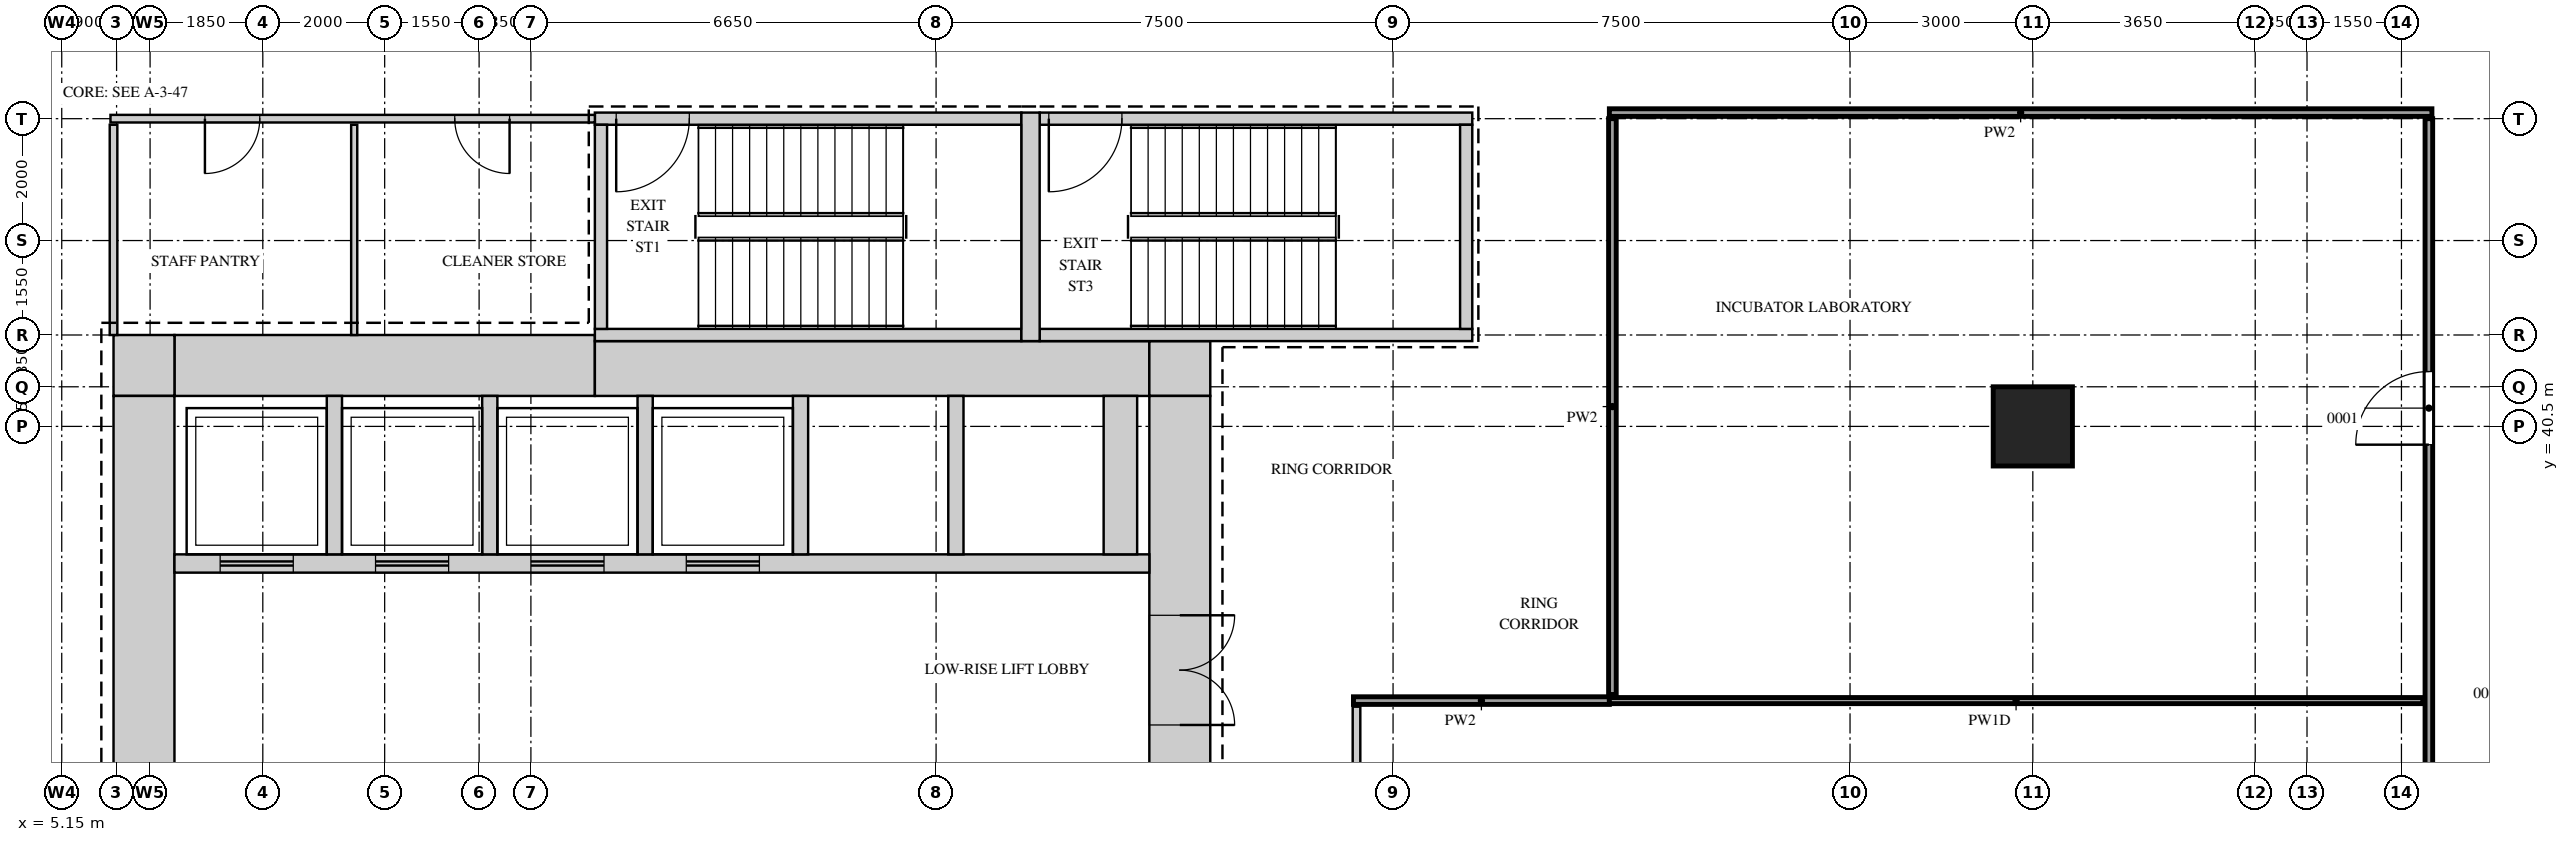
"""IFC4 building model, lengths in metres.
Left out: names, types, materials, properties, quantities, classifications, styles, units other than length and angle.
Written with IfcOpenShell. Run it as: python <this file> out.ifc"""

import sys

from ifc_helpers import new_model, si_unit, direction, frame, frame_2d, origin, origin_2d, place, context, subcontext, project, spatial, rectangle, extrude, source, transform, mapped, element, fill, save


model = new_model("IFC4")
c1 = context("Model", 3, precision=1e-05, world=origin(), true_north=direction((0.0, 1.0)))
c2 = subcontext(c1, "Body", "Model", "MODEL_VIEW")
j1 = project(units=[si_unit("LENGTHUNIT", "METRE"), si_unit("PLANEANGLEUNIT", "RADIAN")], contexts=[c1])
p1 = place(None, origin())
s1 = spatial("IfcSite", under=j1, at=p1, CompositionType="ELEMENT")
p2 = place(p1, origin())
s2 = spatial("IfcBuilding", under=s1, at=p2, CompositionType="ELEMENT")
p3 = place(p2, frame((0.0, 0.0, 149.9)))
s3 = spatial("IfcBuildingStorey", under=s2, at=p3, CompositionType="ELEMENT", Elevation=149.9)
m1 = source(origin(), c2, "Body", "SweptSolid", [
    extrude(rectangle(XDim=6.9, YDim=1.0, at=frame_2d((3.45, 0.0))), origin(), (0.0, 0.0, 1.0), 4.1),
])
p4 = place(p3, frame((7.0, 41.5, 0.0), z_axis=(0.0, 0.0, 1.0), x_axis=(1.0, 0.0, 0.0)))
e1 = element("IfcWall", 1, at=p4, inside=s3, PredefinedType="SHEAR", context=c2, shape_type="MappedRepresentation", body=[
    mapped(m1, transform((0.0, 0.0, 0.0))),
])
m2 = source(origin(), c2, "Body", "SweptSolid", [
    extrude(rectangle(XDim=9.1, YDim=0.9, at=frame_2d((4.55, 0.0))), origin(), (0.0, 0.0, 1.0), 4.1),
])
p5 = place(p3, frame((13.9, 41.45, 0.0), z_axis=(0.0, 0.0, 1.0), x_axis=(1.0, 0.0, 0.0)))
e2 = element("IfcWall", 2, at=p5, inside=s3, PredefinedType="SHEAR", context=c2, shape_type="MappedRepresentation", body=[
    mapped(m2, transform((0.0, 0.0, 0.0))),
])
m3 = source(origin(), c2, "Body", "SweptSolid", [
    extrude(rectangle(XDim=1.0, YDim=0.9, at=frame_2d((0.5, 0.0))), origin(), (0.0, 0.0, 1.0), 4.1),
])
p6 = place(p3, frame((23.0, 41.45, 0.0), z_axis=(0.0, 0.0, 1.0), x_axis=(1.0, 0.0, 0.0)))
e3 = element("IfcWall", 3, at=p6, inside=s3, PredefinedType="SHEAR", context=c2, shape_type="MappedRepresentation", body=[
    mapped(m3, transform((0.0, 0.0, 0.0))),
])
m4 = source(origin(), c2, "Body", "SweptSolid", [
    extrude(rectangle(XDim=1.0, YDim=1.0, at=frame_2d((0.5, 0.0))), origin(), (0.0, 0.0, 1.0), 4.1),
])
p7 = place(p3, frame((6.0, 41.5, 0.0), z_axis=(0.0, 0.0, 1.0), x_axis=(1.0, 0.0, 0.0)))
e4 = element("IfcWall", 4, at=p7, inside=s3, PredefinedType="SHEAR", context=c2, shape_type="MappedRepresentation", body=[
    mapped(m4, transform((0.0, 0.0, 0.0))),
])
m5 = source(origin(), c2, "Body", "SweptSolid", [
    extrude(rectangle(XDim=28.0, YDim=1.0, at=frame_2d((14.0, 0.0))), origin(), (0.0, 0.0, 1.0), 4.1),
])
p8 = place(p3, frame((23.5, 13.0, 0.0), z_axis=(0.0, 0.0, 1.0), x_axis=(0.0, 1.0, 0.0)))
e5 = element("IfcWall", 5, at=p8, inside=s3, PredefinedType="SHEAR", context=c2, shape_type="MappedRepresentation", body=[
    mapped(m5, transform((0.0, 0.0, 0.0))),
])
m6 = source(origin(), c2, "Body", "SweptSolid", [
    extrude(rectangle(XDim=1.8, YDim=2.1, at=frame_2d((0.9, 1.05))), frame((0.0, 0.51, 0.0), z_axis=(0.0, -1.0, 0.0), x_axis=(1.0, 0.0, 0.0)), (0.0, 0.0, 1.0), 1.02),
])
p9 = place(p8, frame((22.6, 0.0, 0.0)))
e6 = element("IfcOpeningElement", 6, at=p9, cuts=e5, PredefinedType="OPENING", context=c2, shape_type="MappedRepresentation", body=[
    mapped(m6, transform((0.0, 0.0, 0.0))),
])
m7 = source(origin(), c2, "Body", "SweptSolid", [
    extrude(rectangle(XDim=1.2, YDim=2.1, at=frame_2d((0.6, 1.05))), frame((0.0, 0.51, 0.0), z_axis=(0.0, -1.0, 0.0), x_axis=(1.0, 0.0, 0.0)), (0.0, 0.0, 1.0), 1.02),
])
p10 = place(p8, frame((14.6, 0.0, 0.0)))
e7 = element("IfcOpeningElement", 7, at=p10, cuts=e5, PredefinedType="OPENING", context=c2, shape_type="MappedRepresentation", body=[
    mapped(m7, transform((0.0, 0.0, 0.0))),
])
m8 = source(origin(), c2, "Body", "SweptSolid", [
    extrude(rectangle(XDim=0.9, YDim=2.1, at=frame_2d((0.45, 1.05))), frame((0.0, 0.51, 0.0), z_axis=(0.0, -1.0, 0.0), x_axis=(1.0, 0.0, 0.0)), (0.0, 0.0, 1.0), 1.02),
])
p11 = place(p8, frame((1.35, 0.0, 0.0)))
e8 = element("IfcOpeningElement", 8, at=p11, cuts=e5, PredefinedType="OPENING", context=c2, shape_type="MappedRepresentation", body=[
    mapped(m8, transform((0.0, 0.0, 0.0))),
])
p12 = place(p8, frame((6.2, 0.0, 0.0)))
e9 = element("IfcOpeningElement", 9, at=p12, cuts=e5, PredefinedType="OPENING", context=c2, shape_type="MappedRepresentation", body=[
    mapped(m8, transform((0.0, 0.0, 0.0))),
])
p13 = place(p3, frame((6.5, 13.0, 0.0), z_axis=(0.0, 0.0, 1.0), x_axis=(0.0, 1.0, 0.0)))
e10 = element("IfcWall", 10, at=p13, inside=s3, PredefinedType="SHEAR", context=c2, shape_type="MappedRepresentation", body=[
    mapped(m5, transform((0.0, 0.0, 0.0))),
])
m9 = source(origin(), c2, "Body", "SweptSolid", [
    extrude(rectangle(XDim=7.0, YDim=0.2, at=frame_2d((3.5, 0.0))), origin(), (0.0, 0.0, 1.0), 4.1),
])
p14 = place(p3, frame((13.9, 45.55, 0.0), z_axis=(0.0, 0.0, 1.0), x_axis=(1.0, 0.0, 0.0)))
e11 = element("IfcWall", 11, at=p14, inside=s3, PredefinedType="SHEAR", context=c2, shape_type="MappedRepresentation", body=[
    mapped(m9, transform((0.0, 0.0, 0.0))),
])
m10 = source(origin(), c2, "Body", "SweptSolid", [
    extrude(rectangle(XDim=1.2, YDim=2.1, at=frame_2d((0.6, 1.05))), frame((0.0, 0.11, 0.0), z_axis=(0.0, -1.0, 0.0), x_axis=(1.0, 0.0, 0.0)), (0.0, 0.0, 1.0), 0.22),
])
p15 = place(p14, frame((0.35, 0.0, 0.0)))
e12 = element("IfcOpeningElement", 12, at=p15, cuts=e11, PredefinedType="OPENING", context=c2, shape_type="MappedRepresentation", body=[
    mapped(m10, transform((0.0, 0.0, 0.0))),
])
p16 = place(p3, frame((13.9, 42.0, 0.0), z_axis=(0.0, 0.0, 1.0), x_axis=(1.0, 0.0, 0.0)))
e13 = element("IfcWall", 13, at=p16, inside=s3, PredefinedType="SHEAR", context=c2, shape_type="MappedRepresentation", body=[
    mapped(m9, transform((0.0, 0.0, 0.0))),
])
m11 = source(origin(), c2, "Body", "SweptSolid", [
    extrude(rectangle(XDim=7.1, YDim=0.2, at=frame_2d((3.55, 0.0))), origin(), (0.0, 0.0, 1.0), 4.1),
])
p17 = place(p3, frame((21.2, 45.55, 0.0), z_axis=(0.0, 0.0, 1.0), x_axis=(1.0, 0.0, 0.0)))
e14 = element("IfcWall", 14, at=p17, inside=s3, PredefinedType="SHEAR", context=c2, shape_type="MappedRepresentation", body=[
    mapped(m11, transform((0.0, 0.0, 0.0))),
])
p18 = place(p17, frame((0.15, 0.0, 0.0)))
e15 = element("IfcOpeningElement", 15, at=p18, cuts=e14, PredefinedType="OPENING", context=c2, shape_type="MappedRepresentation", body=[
    mapped(m10, transform((0.0, 0.0, 0.0))),
])
p19 = place(p3, frame((21.2, 42.0, 0.0), z_axis=(0.0, 0.0, 1.0), x_axis=(1.0, 0.0, 0.0)))
e16 = element("IfcWall", 16, at=p19, inside=s3, PredefinedType="SHEAR", context=c2, shape_type="MappedRepresentation", body=[
    mapped(m11, transform((0.0, 0.0, 0.0))),
])
m12 = source(origin(), c2, "Body", "SweptSolid", [
    extrude(rectangle(XDim=3.75, YDim=0.3, at=frame_2d((1.875, 0.0))), origin(), (0.0, 0.0, 1.0), 4.1),
])
p20 = place(p3, frame((21.05, 41.9, 0.0), z_axis=(0.0, 0.0, 1.0), x_axis=(0.0, 1.0, 0.0)))
e17 = element("IfcWall", 17, at=p20, inside=s3, PredefinedType="SHEAR", context=c2, shape_type="MappedRepresentation", body=[
    mapped(m12, transform((0.0, 0.0, 0.0))),
])
m13 = source(origin(), c2, "Body", "SweptSolid", [
    extrude(rectangle(XDim=3.35, YDim=0.2, at=frame_2d((1.675, 0.0))), origin(), (0.0, 0.0, 1.0), 4.1),
])
for number, where, z_axis, x_axis in (
    (18, (14.0, 42.1, 0.0), (0.0, 0.0, 1.0), (0.0, 1.0, 0.0)),
    (19, (28.2, 42.1, 0.0), (0.0, 0.0, 1.0), (0.0, 1.0, 0.0)),
):
    element("IfcWall", number, at=place(p3, frame(where, z_axis=z_axis, x_axis=x_axis)), inside=s3, PredefinedType="SHEAR", context=c2, shape_type="MappedRepresentation", body=[
        mapped(m13, transform((0.0, 0.0, 0.0))),
    ])
m14 = source(origin(), c2, "Body", "SweptSolid", [
    extrude(rectangle(XDim=16.0, YDim=0.3, at=frame_2d((8.0, 0.0))), origin(), (0.0, 0.0, 1.0), 4.1),
])
p21 = place(p3, frame((7.0, 38.25, 0.0), z_axis=(0.0, 0.0, 1.0), x_axis=(1.0, 0.0, 0.0)))
e20 = element("IfcWall", 20, at=p21, inside=s3, PredefinedType="STANDARD", context=c2, shape_type="MappedRepresentation", body=[
    mapped(m14, transform((0.0, 0.0, 0.0))),
])
m15 = source(origin(), c2, "Body", "SweptSolid", [
    extrude(rectangle(XDim=1.2, YDim=2.1, at=frame_2d((0.6, 1.05))), frame((0.0, 0.16, 0.0), z_axis=(0.0, -1.0, 0.0), x_axis=(1.0, 0.0, 0.0)), (0.0, 0.0, 1.0), 0.32),
])
p22 = place(p21, frame((0.75, 0.0, 0.0)))
e21 = element("IfcOpeningElement", 21, at=p22, cuts=e20, PredefinedType="OPENING", context=c2, shape_type="MappedRepresentation", body=[
    mapped(m15, transform((0.0, 0.0, 0.0))),
])
p23 = place(p21, frame((3.3, 0.0, 0.0)))
e22 = element("IfcOpeningElement", 22, at=p23, cuts=e20, PredefinedType="OPENING", context=c2, shape_type="MappedRepresentation", body=[
    mapped(m15, transform((0.0, 0.0, 0.0))),
])
p24 = place(p21, frame((5.85, 0.0, 0.0)))
e23 = element("IfcOpeningElement", 23, at=p24, cuts=e20, PredefinedType="OPENING", context=c2, shape_type="MappedRepresentation", body=[
    mapped(m15, transform((0.0, 0.0, 0.0))),
])
p25 = place(p21, frame((8.4, 0.0, 0.0)))
e24 = element("IfcOpeningElement", 24, at=p25, cuts=e20, PredefinedType="OPENING", context=c2, shape_type="MappedRepresentation", body=[
    mapped(m15, transform((0.0, 0.0, 0.0))),
])
m16 = source(origin(), c2, "Body", "SweptSolid", [
    extrude(rectangle(XDim=2.6, YDim=0.25, at=frame_2d((1.3, 0.0))), origin(), (0.0, 0.0, 1.0), 4.1),
])
for number, where, z_axis, x_axis in (
    (25, (9.625, 38.4, 0.0), (0.0, 0.0, 1.0), (0.0, 1.0, 0.0)),
    (26, (12.175, 38.4, 0.0), (0.0, 0.0, 1.0), (0.0, 1.0, 0.0)),
    (27, (14.725, 38.4, 0.0), (0.0, 0.0, 1.0), (0.0, 1.0, 0.0)),
    (28, (17.275, 38.4, 0.0), (0.0, 0.0, 1.0), (0.0, 1.0, 0.0)),
    (29, (19.825, 38.4, 0.0), (0.0, 0.0, 1.0), (0.0, 1.0, 0.0)),
):
    element("IfcWall", number, at=place(p3, frame(where, z_axis=z_axis, x_axis=x_axis)), inside=s3, PredefinedType="STANDARD", context=c2, shape_type="MappedRepresentation", body=[
        mapped(m16, transform((0.0, 0.0, 0.0))),
    ])
m17 = source(origin(), c2, "Body", "SweptSolid", [
    extrude(rectangle(XDim=2.6, YDim=0.55, at=frame_2d((1.3, 0.0))), origin(), (0.0, 0.0, 1.0), 4.1),
])
p26 = place(p3, frame((22.525, 38.4, 0.0), z_axis=(0.0, 0.0, 1.0), x_axis=(0.0, 1.0, 0.0)))
e30 = element("IfcWall", 30, at=p26, inside=s3, PredefinedType="STANDARD", context=c2, shape_type="MappedRepresentation", body=[
    mapped(m17, transform((0.0, 0.0, 0.0))),
])
m18 = source(origin(), c2, "Body", "SweptSolid", [
    extrude(rectangle(XDim=1.3, YDim=1.3, at=origin_2d()), origin(), (0.0, 0.0, 1.0), 4.1),
])
p27 = place(p3, frame((37.5, 40.5, 0.0), z_axis=(0.0, 0.0, 1.0), x_axis=(1.0, 0.0, 0.0)))
e31 = element("IfcColumn", 31, at=p27, inside=s3, PredefinedType="COLUMN", context=c2, shape_type="MappedRepresentation", body=[
    mapped(m18, transform((0.0, 0.0, 0.0))),
])
m19 = source(origin(), c2, "Body", "SweptSolid", [
    extrude(rectangle(XDim=23.2, YDim=0.125, at=frame_2d((11.6, 0.0))), origin(), (0.0, 0.0, 1.0), 4.2),
])
p28 = place(p3, frame((26.4, 12.7, 0.0), z_axis=(0.0, 0.0, 1.0), x_axis=(0.0, 1.0, 0.0)))
e32 = element("IfcWall", 32, at=p28, inside=s3, PredefinedType="PARTITIONING", context=c2, shape_type="MappedRepresentation", body=[
    mapped(m19, transform((0.0, 0.0, 0.0))),
])
m20 = source(origin(), c2, "Body", "SweptSolid", [
    extrude(rectangle(XDim=1.2, YDim=2.1, at=frame_2d((0.6, 1.05))), frame((0.0, 0.073, 0.0), z_axis=(0.0, -1.0, 0.0), x_axis=(1.0, 0.0, 0.0)), (0.0, 0.0, 1.0), 0.145),
])
p29 = place(p28, frame((6.65, 0.0, 0.0)))
e33 = element("IfcOpeningElement", 33, at=p29, cuts=e32, PredefinedType="OPENING", context=c2, shape_type="MappedRepresentation", body=[
    mapped(m20, transform((0.0, 0.0, 0.0))),
])
m21 = source(origin(), c2, "Body", "SweptSolid", [
    extrude(rectangle(XDim=32.85, YDim=0.125, at=frame_2d((16.425, 0.0))), origin(), (0.0, 0.0, 1.0), 4.2),
])
p30 = place(p3, frame((44.0, 12.7, 0.0), z_axis=(0.0, 0.0, 1.0), x_axis=(0.0, 1.0, 0.0)))
e34 = element("IfcWall", 34, at=p30, inside=s3, PredefinedType="PARTITIONING", context=c2, shape_type="MappedRepresentation", body=[
    mapped(m21, transform((0.0, 0.0, 0.0))),
])
p31 = place(p30, frame((18.2, 0.0, 0.0)))
e35 = element("IfcOpeningElement", 35, at=p31, cuts=e34, PredefinedType="OPENING", context=c2, shape_type="MappedRepresentation", body=[
    mapped(m20, transform((0.0, 0.0, 0.0))),
])
p32 = place(p30, frame((27.5, 0.0, 0.0)))
e36 = element("IfcOpeningElement", 36, at=p32, cuts=e34, PredefinedType="OPENING", context=c2, shape_type="MappedRepresentation", body=[
    mapped(m20, transform((0.0, 0.0, 0.0))),
])
m22 = source(origin(), c2, "Body", "SweptSolid", [
    extrude(rectangle(XDim=4.2, YDim=0.125, at=frame_2d((2.1, 0.0))), origin(), (0.0, 0.0, 1.0), 4.2),
])
p33 = place(p3, frame((26.35, 36.0, 0.0), z_axis=(0.0, 0.0, 1.0), x_axis=(1.0, 0.0, 0.0)))
e37 = element("IfcWall", 37, at=p33, inside=s3, PredefinedType="PARTITIONING", context=c2, shape_type="MappedRepresentation", body=[
    mapped(m22, transform((0.0, 0.0, 0.0))),
])
m23 = source(origin(), c2, "Body", "SweptSolid", [
    extrude(rectangle(XDim=13.35, YDim=0.1, at=frame_2d((6.675, 0.0))), origin(), (0.0, 0.0, 1.0), 4.2),
])
p34 = place(p3, frame((30.55, 36.0, 0.0), z_axis=(0.0, 0.0, 1.0), x_axis=(1.0, 0.0, 0.0)))
e38 = element("IfcWall", 38, at=p34, inside=s3, PredefinedType="PARTITIONING", context=c2, shape_type="MappedRepresentation", body=[
    mapped(m23, transform((0.0, 0.0, 0.0))),
])
m24 = source(origin(), c2, "Body", "SweptSolid", [
    extrude(rectangle(XDim=9.45, YDim=0.125, at=frame_2d((4.725, 0.0))), origin(), (0.0, 0.0, 1.0), 4.2),
])
p35 = place(p3, frame((30.6, 36.1, 0.0), z_axis=(0.0, 0.0, 1.0), x_axis=(0.0, 1.0, 0.0)))
e39 = element("IfcWall", 39, at=p35, inside=s3, PredefinedType="PARTITIONING", context=c2, shape_type="MappedRepresentation", body=[
    mapped(m24, transform((0.0, 0.0, 0.0))),
])
m25 = source(origin(), c2, "Body", "SweptSolid", [
    extrude(rectangle(XDim=3.45, YDim=0.125, at=frame_2d((1.725, 0.0))), origin(), (0.0, 0.0, 1.0), 4.2),
])
p36 = place(p3, frame((6.0, 42.0, 0.0), z_axis=(0.0, 0.0, 1.0), x_axis=(0.0, 1.0, 0.0)))
e40 = element("IfcWall", 40, at=p36, inside=s3, PredefinedType="PARTITIONING", context=c2, shape_type="MappedRepresentation", body=[
    mapped(m25, transform((0.0, 0.0, 0.0))),
])
m26 = source(origin(), c2, "Body", "SweptSolid", [
    extrude(rectangle(XDim=3.45, YDim=0.1, at=frame_2d((1.725, 0.0))), origin(), (0.0, 0.0, 1.0), 4.2),
])
p37 = place(p3, frame((9.95, 42.0, 0.0), z_axis=(0.0, 0.0, 1.0), x_axis=(0.0, 1.0, 0.0)))
e41 = element("IfcWall", 41, at=p37, inside=s3, PredefinedType="PARTITIONING", context=c2, shape_type="MappedRepresentation", body=[
    mapped(m26, transform((0.0, 0.0, 0.0))),
])
m27 = source(origin(), c2, "Body", "SweptSolid", [
    extrude(rectangle(XDim=7.95, YDim=0.125, at=frame_2d((3.975, 0.0))), origin(), (0.0, 0.0, 1.0), 4.2),
])
p38 = place(p3, frame((5.95, 45.55, 0.0), z_axis=(0.0, 0.0, 1.0), x_axis=(1.0, 0.0, 0.0)))
e42 = element("IfcWall", 42, at=p38, inside=s3, PredefinedType="PARTITIONING", context=c2, shape_type="MappedRepresentation", body=[
    mapped(m27, transform((0.0, 0.0, 0.0))),
])
m28 = source(origin(), c2, "Body", "SweptSolid", [
    extrude(rectangle(XDim=0.9, YDim=2.1, at=frame_2d((0.45, 1.05))), frame((0.0, 0.073, 0.0), z_axis=(0.0, -1.0, 0.0), x_axis=(1.0, 0.0, 0.0)), (0.0, 0.0, 1.0), 0.145),
])
p39 = place(p38, frame((1.55, 0.0, 0.0)))
e43 = element("IfcOpeningElement", 43, at=p39, cuts=e42, PredefinedType="OPENING", context=c2, shape_type="MappedRepresentation", body=[
    mapped(m28, transform((0.0, 0.0, 0.0))),
])
p40 = place(p38, frame((5.65, 0.0, 0.0)))
e44 = element("IfcOpeningElement", 44, at=p40, cuts=e42, PredefinedType="OPENING", context=c2, shape_type="MappedRepresentation", body=[
    mapped(m28, transform((0.0, 0.0, 0.0))),
])
m29 = source(origin(), c2, "Body", "SweptSolid", [
    extrude(rectangle(XDim=13.5, YDim=0.125, at=frame_2d((6.75, 0.0))), origin(), (0.0, 0.0, 1.0), 4.2),
])
p41 = place(p3, frame((30.55, 45.65, 0.0), z_axis=(0.0, 0.0, 1.0), x_axis=(1.0, 0.0, 0.0)))
e45 = element("IfcWall", 45, at=p41, inside=s3, PredefinedType="PARTITIONING", context=c2, shape_type="MappedRepresentation", body=[
    mapped(m29, transform((0.0, 0.0, 0.0))),
])
m30 = source(origin(), c2, "Body", "SweptSolid", [
    extrude(rectangle(XDim=1.8, YDim=2.1, at=frame_2d((0.9, 1.05))), frame((0.0, 0.45, 0.0), z_axis=(0.0, -1.0, 0.0), x_axis=(1.0, 0.0, 0.0)), (0.0, 0.0, 1.0), 0.9),
])
p42 = place(p9, origin())
e46 = element("IfcDoor", 46, at=p42, inside=s3, OperationType="DOUBLE_DOOR_SINGLE_SWING", PredefinedType="DOOR", context=c2, shape_type="MappedRepresentation", body=[
    mapped(m30, transform((0.0, 0.0, 0.0))),
])
fill(e6, e46)
m31 = source(origin(), c2, "Body", "SweptSolid", [
    extrude(rectangle(XDim=1.2, YDim=2.1, at=frame_2d((0.6, 1.05))), frame((0.0, 0.025, 0.0), z_axis=(0.0, -1.0, 0.0), x_axis=(1.0, 0.0, 0.0)), (0.0, 0.0, 1.0), 0.05),
])
p43 = place(p32, origin())
e47 = element("IfcDoor", 47, at=p43, inside=s3, OperationType="SINGLE_SWING_RIGHT", PredefinedType="DOOR", context=c2, shape_type="MappedRepresentation", body=[
    mapped(m31, transform((0.0, 0.0, 0.0))),
])
fill(e36, e47)
m32 = source(origin(), c2, "Body", "SweptSolid", [
    extrude(rectangle(XDim=0.9, YDim=2.1, at=frame_2d((0.45, 1.05))), frame((0.0, 0.025, 0.0), z_axis=(0.0, -1.0, 0.0), x_axis=(1.0, 0.0, 0.0)), (0.0, 0.0, 1.0), 0.05),
])
p44 = place(p39, origin())
e48 = element("IfcDoor", 48, at=p44, inside=s3, OperationType="SINGLE_SWING_LEFT", PredefinedType="DOOR", context=c2, shape_type="MappedRepresentation", body=[
    mapped(m32, transform((0.0, 0.0, 0.0))),
])
fill(e43, e48)
p45 = place(p40, origin())
e49 = element("IfcDoor", 49, at=p45, inside=s3, OperationType="SINGLE_SWING_RIGHT", PredefinedType="DOOR", context=c2, shape_type="MappedRepresentation", body=[
    mapped(m32, transform((0.0, 0.0, 0.0))),
])
fill(e44, e49)
p46 = place(p15, origin())
e50 = element("IfcDoor", 50, at=p46, inside=s3, OperationType="SINGLE_SWING_LEFT", PredefinedType="DOOR", context=c2, shape_type="MappedRepresentation", body=[
    mapped(m31, transform((0.0, 0.0, 0.0))),
])
fill(e12, e50)
p47 = place(p18, origin())
e51 = element("IfcDoor", 51, at=p47, inside=s3, OperationType="SINGLE_SWING_LEFT", PredefinedType="DOOR", context=c2, shape_type="MappedRepresentation", body=[
    mapped(m31, transform((0.0, 0.0, 0.0))),
])
fill(e15, e51)
p48 = place(p22, origin())
e52 = element("IfcDoor", 52, at=p48, inside=s3, OperationType="DOUBLE_DOOR_SLIDING", PredefinedType="DOOR", context=c2, shape_type="MappedRepresentation", body=[
    mapped(m31, transform((0.0, 0.0, 0.0))),
])
fill(e21, e52)
p49 = place(p23, origin())
e53 = element("IfcDoor", 53, at=p49, inside=s3, OperationType="DOUBLE_DOOR_SLIDING", PredefinedType="DOOR", context=c2, shape_type="MappedRepresentation", body=[
    mapped(m31, transform((0.0, 0.0, 0.0))),
])
fill(e22, e53)
p50 = place(p24, origin())
e54 = element("IfcDoor", 54, at=p50, inside=s3, OperationType="DOUBLE_DOOR_SLIDING", PredefinedType="DOOR", context=c2, shape_type="MappedRepresentation", body=[
    mapped(m31, transform((0.0, 0.0, 0.0))),
])
fill(e23, e54)
p51 = place(p25, origin())
e55 = element("IfcDoor", 55, at=p51, inside=s3, OperationType="DOUBLE_DOOR_SLIDING", PredefinedType="DOOR", context=c2, shape_type="MappedRepresentation", body=[
    mapped(m31, transform((0.0, 0.0, 0.0))),
])
fill(e24, e55)
save(model, sys.argv[1])
